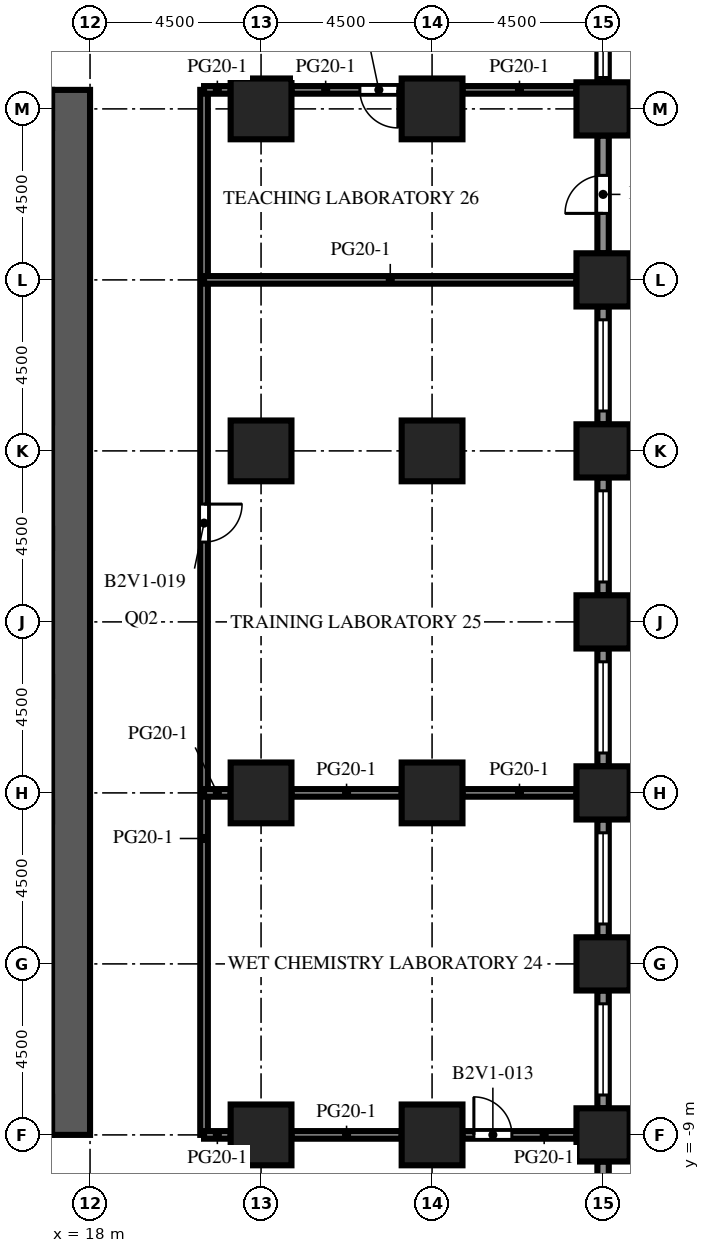
"""IFC4 building model, lengths in metres.
Left out: names, types, materials, properties, quantities, classifications, styles, units other than length and angle.
Written with IfcOpenShell. Run it as: python <this file> out.ifc"""

import sys

from ifc_helpers import new_model, si_unit, direction, frame, frame_2d, origin, origin_2d, place, context, subcontext, project, spatial, rectangle, extrude, element, fill, save


model = new_model("IFC4")
c1 = context("Model", 3, precision=1e-05, world=origin(), true_north=direction((0.0, 1.0)))
c2 = subcontext(c1, "Body", "Model", "MODEL_VIEW")
j1 = project(units=[si_unit("LENGTHUNIT", "METRE"), si_unit("PLANEANGLEUNIT", "RADIAN")], contexts=[c1])
p1 = place(None, origin())
s1 = spatial("IfcSite", under=j1, at=p1, CompositionType="ELEMENT")
p2 = place(p1, origin())
s2 = spatial("IfcBuilding", under=s1, at=p2, CompositionType="ELEMENT")
p3 = place(p2, frame((0.0, 0.0, 50.1)))
s3 = spatial("IfcBuildingStorey", under=s2, at=p3, CompositionType="ELEMENT", Elevation=50.1)
for number, where, z_axis, x_axis in (
    (1, (31.5, -9.0, 0.0), (0.0, 0.0, 1.0), (1.0, 0.0, 0.0)),
    (2, (31.5, -4.5, 0.0), (0.0, 0.0, 1.0), (1.0, 0.0, 0.0)),
    (3, (31.5, 0.0, 0.0), (0.0, 0.0, 1.0), (1.0, 0.0, 0.0)),
    (4, (31.5, 4.5, 0.0), (0.0, 0.0, 1.0), (1.0, 0.0, 0.0)),
    (5, (31.5, 9.0, 0.0), (0.0, 0.0, 1.0), (1.0, 0.0, 0.0)),
    (6, (31.5, 13.5, 0.0), (0.0, 0.0, 1.0), (1.0, 0.0, 0.0)),
    (7, (31.5, 18.0, 0.0), (0.0, 0.0, 1.0), (1.0, 0.0, 0.0)),
):
    element("IfcColumn", number, at=place(p3, frame(where, z_axis=z_axis, x_axis=x_axis)), inside=s3, PredefinedType="COLUMN", context=c2, shape_type="SweptSolid", body=[
        extrude(rectangle(XDim=1.4, YDim=1.4, at=origin_2d()), origin(), (0.0, 0.0, 1.0), 4.1),
    ])
for number, where, z_axis, x_axis in (
    (8, (22.5, -9.0, 0.0), (0.0, 0.0, 1.0), (1.0, 0.0, 0.0)),
    (9, (22.5, 0.0, 0.0), (0.0, 0.0, 1.0), (1.0, 0.0, 0.0)),
    (10, (22.5, 9.0, 0.0), (0.0, 0.0, 1.0), (1.0, 0.0, 0.0)),
    (11, (22.5, 18.0, 0.0), (0.0, 0.0, 1.0), (1.0, 0.0, 0.0)),
    (12, (27.0, -9.0, 0.0), (0.0, 0.0, 1.0), (1.0, 0.0, 0.0)),
    (13, (27.0, 0.0, 0.0), (0.0, 0.0, 1.0), (1.0, 0.0, 0.0)),
    (14, (27.0, 9.0, 0.0), (0.0, 0.0, 1.0), (1.0, 0.0, 0.0)),
    (15, (27.0, 18.0, 0.0), (0.0, 0.0, 1.0), (1.0, 0.0, 0.0)),
):
    element("IfcColumn", number, at=place(p3, frame(where, z_axis=z_axis, x_axis=x_axis)), inside=s3, PredefinedType="COLUMN", context=c2, shape_type="SweptSolid", body=[
        extrude(rectangle(XDim=1.6, YDim=1.6, at=origin_2d()), origin(), (0.0, 0.0, 1.0), 4.1),
    ])
p4 = place(p3, frame((17.5, -9.0, 0.0), z_axis=(0.0, 0.0, 1.0), x_axis=(0.0, 1.0, 0.0)))
e16 = element("IfcWall", 16, at=p4, inside=s3, PredefinedType="SHEAR", context=c2, shape_type="SweptSolid", body=[
    extrude(rectangle(XDim=27.5, YDim=1.0, at=frame_2d((13.75, 0.0))), origin(), (0.0, 0.0, 1.0), 4.1),
])
p5 = place(p4, frame((12.55, 0.0, 0.0)))
e17 = element("IfcOpeningElement", 17, at=p5, cuts=e16, PredefinedType="OPENING", context=c2, shape_type="SweptSolid", body=[
    extrude(rectangle(XDim=2.4, YDim=2.4, at=frame_2d((1.2, 1.2))), frame((0.0, 0.51, 0.0), z_axis=(0.0, -1.0, 0.0), x_axis=(1.0, 0.0, 0.0)), (0.0, 0.0, 1.0), 1.02),
])
p6 = place(p4, frame((6.825, 0.0, 0.0)))
e18 = element("IfcOpeningElement", 18, at=p6, cuts=e16, PredefinedType="OPENING", context=c2, shape_type="SweptSolid", body=[
    extrude(rectangle(XDim=1.2, YDim=2.1, at=frame_2d((0.6, 1.05))), frame((0.0, 0.51, 0.0), z_axis=(0.0, -1.0, 0.0), x_axis=(1.0, 0.0, 0.0)), (0.0, 0.0, 1.0), 1.02),
])
p7 = place(p4, frame((19.475, 0.0, 0.0)))
e19 = element("IfcOpeningElement", 19, at=p7, cuts=e16, PredefinedType="OPENING", context=c2, shape_type="SweptSolid", body=[
    extrude(rectangle(XDim=1.2, YDim=2.1, at=frame_2d((0.6, 1.05))), frame((0.0, 0.51, 0.0), z_axis=(0.0, -1.0, 0.0), x_axis=(1.0, 0.0, 0.0)), (0.0, 0.0, 1.0), 1.02),
])
p8 = place(p3, frame((31.5, -9.7, 0.0), z_axis=(0.0, 0.0, 1.0), x_axis=(0.0, -1.0, 0.0)))
e20 = element("IfcWall", 20, at=p8, inside=s3, PredefinedType="SOLIDWALL", context=c2, shape_type="SweptSolid", body=[
    extrude(rectangle(XDim=3.1, YDim=0.3, at=frame_2d((1.55, 0.0))), origin(), (0.0, 0.0, 1.0), 2.75),
])
p9 = place(p8, frame((0.475, 0.0, 0.8)))
e21 = element("IfcOpeningElement", 21, at=p9, cuts=e20, PredefinedType="OPENING", context=c2, shape_type="SweptSolid", body=[
    extrude(rectangle(XDim=1.2, YDim=1.7, at=frame_2d((0.6, 0.85))), frame((0.0, 0.16, 0.0), z_axis=(0.0, -1.0, 0.0), x_axis=(1.0, 0.0, 0.0)), (0.0, 0.0, 1.0), 0.32),
])
p10 = place(p3, frame((31.5, -5.2, 0.0), z_axis=(0.0, 0.0, 1.0), x_axis=(0.0, -1.0, 0.0)))
e22 = element("IfcWall", 22, at=p10, inside=s3, PredefinedType="SOLIDWALL", context=c2, shape_type="SweptSolid", body=[
    extrude(rectangle(XDim=3.1, YDim=0.3, at=frame_2d((1.55, 0.0))), origin(), (0.0, 0.0, 1.0), 2.75),
])
p11 = place(p10, frame((0.35, 0.0, 0.8)))
e23 = element("IfcOpeningElement", 23, at=p11, cuts=e22, PredefinedType="OPENING", context=c2, shape_type="SweptSolid", body=[
    extrude(rectangle(XDim=2.4, YDim=1.7, at=frame_2d((1.2, 0.85))), frame((0.0, 0.16, 0.0), z_axis=(0.0, -1.0, 0.0), x_axis=(1.0, 0.0, 0.0)), (0.0, 0.0, 1.0), 0.32),
])
p12 = place(p3, frame((31.5, -0.7, 0.0), z_axis=(0.0, 0.0, 1.0), x_axis=(0.0, -1.0, 0.0)))
e24 = element("IfcWall", 24, at=p12, inside=s3, PredefinedType="SOLIDWALL", context=c2, shape_type="SweptSolid", body=[
    extrude(rectangle(XDim=3.1, YDim=0.3, at=frame_2d((1.55, 0.0))), origin(), (0.0, 0.0, 1.0), 2.75),
])
p13 = place(p12, frame((0.35, 0.0, 0.8)))
e25 = element("IfcOpeningElement", 25, at=p13, cuts=e24, PredefinedType="OPENING", context=c2, shape_type="SweptSolid", body=[
    extrude(rectangle(XDim=2.4, YDim=1.7, at=frame_2d((1.2, 0.85))), frame((0.0, 0.16, 0.0), z_axis=(0.0, -1.0, 0.0), x_axis=(1.0, 0.0, 0.0)), (0.0, 0.0, 1.0), 0.32),
])
p14 = place(p3, frame((31.5, 3.8, 0.0), z_axis=(0.0, 0.0, 1.0), x_axis=(0.0, -1.0, 0.0)))
e26 = element("IfcWall", 26, at=p14, inside=s3, PredefinedType="SOLIDWALL", context=c2, shape_type="SweptSolid", body=[
    extrude(rectangle(XDim=3.1, YDim=0.3, at=frame_2d((1.55, 0.0))), origin(), (0.0, 0.0, 1.0), 2.75),
])
p15 = place(p14, frame((0.35, 0.0, 0.8)))
e27 = element("IfcOpeningElement", 27, at=p15, cuts=e26, PredefinedType="OPENING", context=c2, shape_type="SweptSolid", body=[
    extrude(rectangle(XDim=2.4, YDim=1.7, at=frame_2d((1.2, 0.85))), frame((0.0, 0.16, 0.0), z_axis=(0.0, -1.0, 0.0), x_axis=(1.0, 0.0, 0.0)), (0.0, 0.0, 1.0), 0.32),
])
p16 = place(p3, frame((31.5, 8.3, 0.0), z_axis=(0.0, 0.0, 1.0), x_axis=(0.0, -1.0, 0.0)))
e28 = element("IfcWall", 28, at=p16, inside=s3, PredefinedType="SOLIDWALL", context=c2, shape_type="SweptSolid", body=[
    extrude(rectangle(XDim=3.1, YDim=0.3, at=frame_2d((1.55, 0.0))), origin(), (0.0, 0.0, 1.0), 2.75),
])
p17 = place(p16, frame((0.35, 0.0, 0.8)))
e29 = element("IfcOpeningElement", 29, at=p17, cuts=e28, PredefinedType="OPENING", context=c2, shape_type="SweptSolid", body=[
    extrude(rectangle(XDim=2.4, YDim=1.7, at=frame_2d((1.2, 0.85))), frame((0.0, 0.16, 0.0), z_axis=(0.0, -1.0, 0.0), x_axis=(1.0, 0.0, 0.0)), (0.0, 0.0, 1.0), 0.32),
])
p18 = place(p3, frame((31.5, 12.8, 0.0), z_axis=(0.0, 0.0, 1.0), x_axis=(0.0, -1.0, 0.0)))
e30 = element("IfcWall", 30, at=p18, inside=s3, PredefinedType="SOLIDWALL", context=c2, shape_type="SweptSolid", body=[
    extrude(rectangle(XDim=3.1, YDim=0.3, at=frame_2d((1.55, 0.0))), origin(), (0.0, 0.0, 1.0), 2.75),
])
p19 = place(p18, frame((0.35, 0.0, 0.8)))
e31 = element("IfcOpeningElement", 31, at=p19, cuts=e30, PredefinedType="OPENING", context=c2, shape_type="SweptSolid", body=[
    extrude(rectangle(XDim=2.4, YDim=1.7, at=frame_2d((1.2, 0.85))), frame((0.0, 0.16, 0.0), z_axis=(0.0, -1.0, 0.0), x_axis=(1.0, 0.0, 0.0)), (0.0, 0.0, 1.0), 0.32),
])
p20 = place(p3, frame((31.5, 17.3, 0.0), z_axis=(0.0, 0.0, 1.0), x_axis=(0.0, -1.0, 0.0)))
e32 = element("IfcWall", 32, at=p20, inside=s3, PredefinedType="SOLIDWALL", context=c2, shape_type="SweptSolid", body=[
    extrude(rectangle(XDim=3.1, YDim=0.3, at=frame_2d((1.55, 0.0))), origin(), (0.0, 0.0, 1.0), 2.75),
])
p21 = place(p20, frame((1.05, 0.0, 0.0)))
e33 = element("IfcOpeningElement", 33, at=p21, cuts=e32, PredefinedType="OPENING", context=c2, shape_type="SweptSolid", body=[
    extrude(rectangle(XDim=1.0, YDim=2.2, at=frame_2d((0.5, 1.1))), frame((0.0, 0.16, 0.0), z_axis=(0.0, -1.0, 0.0), x_axis=(1.0, 0.0, 0.0)), (0.0, 0.0, 1.0), 0.32),
])
p22 = place(p3, frame((31.5, 21.8, 0.0), z_axis=(0.0, 0.0, 1.0), x_axis=(0.0, -1.0, 0.0)))
e34 = element("IfcWall", 34, at=p22, inside=s3, PredefinedType="SOLIDWALL", context=c2, shape_type="SweptSolid", body=[
    extrude(rectangle(XDim=3.1, YDim=0.3, at=frame_2d((1.55, 0.0))), origin(), (0.0, 0.0, 1.0), 2.75),
])
p23 = place(p22, frame((0.575, 0.0, 0.8)))
e35 = element("IfcOpeningElement", 35, at=p23, cuts=e34, PredefinedType="OPENING", context=c2, shape_type="SweptSolid", body=[
    extrude(rectangle(XDim=2.4, YDim=1.7, at=frame_2d((1.2, 0.85))), frame((0.0, 0.16, 0.0), z_axis=(0.0, -1.0, 0.0), x_axis=(1.0, 0.0, 0.0)), (0.0, 0.0, 1.0), 0.32),
])
p24 = place(p3, frame((21.0, 18.5, 0.0), z_axis=(0.0, 0.0, 1.0), x_axis=(0.0, -1.0, 0.0)))
e36 = element("IfcWall", 36, at=p24, inside=s3, PredefinedType="PARTITIONING", context=c2, shape_type="SweptSolid", body=[
    extrude(rectangle(XDim=27.5, YDim=0.2, at=frame_2d((13.75, 0.0))), origin(), (0.0, 0.0, 1.0), 3.65),
])
p25 = place(p24, frame((10.9, 0.0, 0.0)))
e37 = element("IfcOpeningElement", 37, at=p25, cuts=e36, PredefinedType="OPENING", context=c2, shape_type="SweptSolid", body=[
    extrude(rectangle(XDim=1.0, YDim=2.1, at=frame_2d((0.5, 1.05))), frame((0.0, 0.11, 0.0), z_axis=(0.0, -1.0, 0.0), x_axis=(1.0, 0.0, 0.0)), (0.0, 0.0, 1.0), 0.22),
])
p26 = place(p3, frame((21.0, -9.0, 0.0), z_axis=(0.0, 0.0, 1.0), x_axis=(1.0, 0.0, 0.0)))
e38 = element("IfcWall", 38, at=p26, inside=s3, PredefinedType="PARTITIONING", context=c2, shape_type="SweptSolid", body=[
    extrude(rectangle(XDim=0.7, YDim=0.2, at=frame_2d((0.35, 0.0))), origin(), (0.0, 0.0, 1.0), 3.65),
])
p27 = place(p3, frame((23.3, -9.0, 0.0), z_axis=(0.0, 0.0, 1.0), x_axis=(1.0, 0.0, 0.0)))
e39 = element("IfcWall", 39, at=p27, inside=s3, PredefinedType="PARTITIONING", context=c2, shape_type="SweptSolid", body=[
    extrude(rectangle(XDim=2.9, YDim=0.2, at=frame_2d((1.45, 0.0))), origin(), (0.0, 0.0, 1.0), 3.65),
])
p28 = place(p3, frame((27.8, -9.0, 0.0), z_axis=(0.0, 0.0, 1.0), x_axis=(1.0, 0.0, 0.0)))
e40 = element("IfcWall", 40, at=p28, inside=s3, PredefinedType="PARTITIONING", context=c2, shape_type="SweptSolid", body=[
    extrude(rectangle(XDim=3.0, YDim=0.2, at=frame_2d((1.5, 0.0))), origin(), (0.0, 0.0, 1.0), 3.65),
])
p29 = place(p28, frame((0.3, 0.0, 0.0)))
e41 = element("IfcOpeningElement", 41, at=p29, cuts=e40, PredefinedType="OPENING", context=c2, shape_type="SweptSolid", body=[
    extrude(rectangle(XDim=1.0, YDim=2.1, at=frame_2d((0.5, 1.05))), frame((0.0, 0.11, 0.0), z_axis=(0.0, -1.0, 0.0), x_axis=(1.0, 0.0, 0.0)), (0.0, 0.0, 1.0), 0.22),
])
p30 = place(p3, frame((21.0, 0.0, 0.0), z_axis=(0.0, 0.0, 1.0), x_axis=(1.0, 0.0, 0.0)))
e42 = element("IfcWall", 42, at=p30, inside=s3, PredefinedType="PARTITIONING", context=c2, shape_type="SweptSolid", body=[
    extrude(rectangle(XDim=0.7, YDim=0.2, at=frame_2d((0.35, 0.0))), origin(), (0.0, 0.0, 1.0), 3.65),
])
p31 = place(p3, frame((23.3, 0.0, 0.0), z_axis=(0.0, 0.0, 1.0), x_axis=(1.0, 0.0, 0.0)))
e43 = element("IfcWall", 43, at=p31, inside=s3, PredefinedType="PARTITIONING", context=c2, shape_type="SweptSolid", body=[
    extrude(rectangle(XDim=2.9, YDim=0.2, at=frame_2d((1.45, 0.0))), origin(), (0.0, 0.0, 1.0), 3.65),
])
p32 = place(p3, frame((27.8, 0.0, 0.0), z_axis=(0.0, 0.0, 1.0), x_axis=(1.0, 0.0, 0.0)))
e44 = element("IfcWall", 44, at=p32, inside=s3, PredefinedType="PARTITIONING", context=c2, shape_type="SweptSolid", body=[
    extrude(rectangle(XDim=3.0, YDim=0.2, at=frame_2d((1.5, 0.0))), origin(), (0.0, 0.0, 1.0), 3.65),
])
p33 = place(p3, frame((21.0, 13.5, 0.0), z_axis=(0.0, 0.0, 1.0), x_axis=(1.0, 0.0, 0.0)))
e45 = element("IfcWall", 45, at=p33, inside=s3, PredefinedType="PARTITIONING", context=c2, shape_type="SweptSolid", body=[
    extrude(rectangle(XDim=9.8, YDim=0.2, at=frame_2d((4.9, 0.0))), origin(), (0.0, 0.0, 1.0), 3.65),
])
p34 = place(p3, frame((21.0, 18.5, 0.0), z_axis=(0.0, 0.0, 1.0), x_axis=(1.0, 0.0, 0.0)))
e46 = element("IfcWall", 46, at=p34, inside=s3, PredefinedType="PARTITIONING", context=c2, shape_type="SweptSolid", body=[
    extrude(rectangle(XDim=0.7, YDim=0.2, at=frame_2d((0.35, 0.0))), origin(), (0.0, 0.0, 1.0), 3.65),
])
p35 = place(p3, frame((26.2, 18.5, 0.0), z_axis=(0.0, 0.0, 1.0), x_axis=(-1.0, 0.0, 0.0)))
e47 = element("IfcWall", 47, at=p35, inside=s3, PredefinedType="PARTITIONING", context=c2, shape_type="SweptSolid", body=[
    extrude(rectangle(XDim=2.9, YDim=0.2, at=frame_2d((1.45, 0.0))), origin(), (0.0, 0.0, 1.0), 3.65),
])
p36 = place(p35, frame((0.1, 0.0, 0.0)))
e48 = element("IfcOpeningElement", 48, at=p36, cuts=e47, PredefinedType="OPENING", context=c2, shape_type="SweptSolid", body=[
    extrude(rectangle(XDim=1.0, YDim=2.1, at=frame_2d((0.5, 1.05))), frame((0.0, 0.11, 0.0), z_axis=(0.0, -1.0, 0.0), x_axis=(1.0, 0.0, 0.0)), (0.0, 0.0, 1.0), 0.22),
])
p37 = place(p3, frame((27.8, 18.5, 0.0), z_axis=(0.0, 0.0, 1.0), x_axis=(1.0, 0.0, 0.0)))
e49 = element("IfcWall", 49, at=p37, inside=s3, PredefinedType="PARTITIONING", context=c2, shape_type="SweptSolid", body=[
    extrude(rectangle(XDim=3.0, YDim=0.2, at=frame_2d((1.5, 0.0))), origin(), (0.0, 0.0, 1.0), 3.65),
])
p38 = place(p11, origin())
e50 = element("IfcWindow", 50, at=p38, inside=s3, PartitioningType="SINGLE_PANEL", PredefinedType="WINDOW", context=c2, shape_type="SweptSolid", body=[
    extrude(rectangle(XDim=2.4, YDim=1.7, at=frame_2d((1.2, 0.85))), frame((0.0, 0.03, 0.0), z_axis=(0.0, -1.0, 0.0), x_axis=(1.0, 0.0, 0.0)), (0.0, 0.0, 1.0), 0.06),
])
fill(e23, e50)
p39 = place(p13, origin())
e51 = element("IfcWindow", 51, at=p39, inside=s3, PartitioningType="SINGLE_PANEL", PredefinedType="WINDOW", context=c2, shape_type="SweptSolid", body=[
    extrude(rectangle(XDim=2.4, YDim=1.7, at=frame_2d((1.2, 0.85))), frame((0.0, 0.03, 0.0), z_axis=(0.0, -1.0, 0.0), x_axis=(1.0, 0.0, 0.0)), (0.0, 0.0, 1.0), 0.06),
])
fill(e25, e51)
p40 = place(p15, origin())
e52 = element("IfcWindow", 52, at=p40, inside=s3, PartitioningType="SINGLE_PANEL", PredefinedType="WINDOW", context=c2, shape_type="SweptSolid", body=[
    extrude(rectangle(XDim=2.4, YDim=1.7, at=frame_2d((1.2, 0.85))), frame((0.0, 0.03, 0.0), z_axis=(0.0, -1.0, 0.0), x_axis=(1.0, 0.0, 0.0)), (0.0, 0.0, 1.0), 0.06),
])
fill(e27, e52)
p41 = place(p17, origin())
e53 = element("IfcWindow", 53, at=p41, inside=s3, PartitioningType="SINGLE_PANEL", PredefinedType="WINDOW", context=c2, shape_type="SweptSolid", body=[
    extrude(rectangle(XDim=2.4, YDim=1.7, at=frame_2d((1.2, 0.85))), frame((0.0, 0.03, 0.0), z_axis=(0.0, -1.0, 0.0), x_axis=(1.0, 0.0, 0.0)), (0.0, 0.0, 1.0), 0.06),
])
fill(e29, e53)
p42 = place(p19, origin())
e54 = element("IfcWindow", 54, at=p42, inside=s3, PartitioningType="SINGLE_PANEL", PredefinedType="WINDOW", context=c2, shape_type="SweptSolid", body=[
    extrude(rectangle(XDim=2.4, YDim=1.7, at=frame_2d((1.2, 0.85))), frame((0.0, 0.03, 0.0), z_axis=(0.0, -1.0, 0.0), x_axis=(1.0, 0.0, 0.0)), (0.0, 0.0, 1.0), 0.06),
])
fill(e31, e54)
p43 = place(p21, origin())
e55 = element("IfcDoor", 55, at=p43, inside=s3, OperationType="SINGLE_SWING_RIGHT", PredefinedType="DOOR", context=c2, shape_type="SweptSolid", body=[
    extrude(rectangle(XDim=1.0, YDim=2.2, at=frame_2d((0.5, 1.1))), frame((0.0, 0.025, 0.0), z_axis=(0.0, -1.0, 0.0), x_axis=(1.0, 0.0, 0.0)), (0.0, 0.0, 1.0), 0.05),
])
fill(e33, e55)
p44 = place(p23, origin())
e56 = element("IfcWindow", 56, at=p44, inside=s3, PartitioningType="SINGLE_PANEL", PredefinedType="WINDOW", context=c2, shape_type="SweptSolid", body=[
    extrude(rectangle(XDim=2.4, YDim=1.7, at=frame_2d((1.2, 0.85))), frame((0.0, 0.03, 0.0), z_axis=(0.0, -1.0, 0.0), x_axis=(1.0, 0.0, 0.0)), (0.0, 0.0, 1.0), 0.06),
])
fill(e35, e56)
p45 = place(p5, origin())
e57 = element("IfcDoor", 57, at=p45, inside=s3, OperationType="DOUBLE_DOOR_DOUBLE_SWING", PredefinedType="DOOR", context=c2, shape_type="SweptSolid", body=[
    extrude(rectangle(XDim=2.4, YDim=2.4, at=frame_2d((1.2, 1.2))), frame((0.0, 0.025, 0.0), z_axis=(0.0, -1.0, 0.0), x_axis=(1.0, 0.0, 0.0)), (0.0, 0.0, 1.0), 0.05),
])
fill(e17, e57)
p46 = place(p6, frame((1.2, 0.0, 0.0), z_axis=(0.0, 0.0, 1.0), x_axis=(-1.0, 0.0, 0.0)))
e58 = element("IfcDoor", 58, at=p46, inside=s3, OperationType="SINGLE_SWING_LEFT", PredefinedType="DOOR", context=c2, shape_type="SweptSolid", body=[
    extrude(rectangle(XDim=1.2, YDim=2.1, at=frame_2d((0.6, 1.05))), frame((0.0, 0.025, 0.0), z_axis=(0.0, -1.0, 0.0), x_axis=(1.0, 0.0, 0.0)), (0.0, 0.0, 1.0), 0.05),
])
fill(e18, e58)
p47 = place(p7, frame((1.2, 0.0, 0.0), z_axis=(0.0, 0.0, 1.0), x_axis=(-1.0, 0.0, 0.0)))
e59 = element("IfcDoor", 59, at=p47, inside=s3, OperationType="SINGLE_SWING_LEFT", PredefinedType="DOOR", context=c2, shape_type="SweptSolid", body=[
    extrude(rectangle(XDim=1.2, YDim=2.1, at=frame_2d((0.6, 1.05))), frame((0.0, 0.025, 0.0), z_axis=(0.0, -1.0, 0.0), x_axis=(1.0, 0.0, 0.0)), (0.0, 0.0, 1.0), 0.05),
])
fill(e19, e59)
p48 = place(p29, origin())
e60 = element("IfcDoor", 60, at=p48, inside=s3, OperationType="SINGLE_SWING_LEFT", PredefinedType="DOOR", context=c2, shape_type="SweptSolid", body=[
    extrude(rectangle(XDim=1.0, YDim=2.1, at=frame_2d((0.5, 1.05))), frame((0.0, 0.025, 0.0), z_axis=(0.0, -1.0, 0.0), x_axis=(1.0, 0.0, 0.0)), (0.0, 0.0, 1.0), 0.05),
])
fill(e41, e60)
p49 = place(p36, origin())
e61 = element("IfcDoor", 61, at=p49, inside=s3, OperationType="SINGLE_SWING_LEFT", PredefinedType="DOOR", context=c2, shape_type="SweptSolid", body=[
    extrude(rectangle(XDim=1.0, YDim=2.1, at=frame_2d((0.5, 1.05))), frame((0.0, 0.025, 0.0), z_axis=(0.0, -1.0, 0.0), x_axis=(1.0, 0.0, 0.0)), (0.0, 0.0, 1.0), 0.05),
])
fill(e48, e61)
p50 = place(p25, origin())
e62 = element("IfcDoor", 62, at=p50, inside=s3, OperationType="SINGLE_SWING_LEFT", PredefinedType="DOOR", context=c2, shape_type="SweptSolid", body=[
    extrude(rectangle(XDim=1.0, YDim=2.1, at=frame_2d((0.5, 1.05))), frame((0.0, 0.025, 0.0), z_axis=(0.0, -1.0, 0.0), x_axis=(1.0, 0.0, 0.0)), (0.0, 0.0, 1.0), 0.05),
])
fill(e37, e62)
save(model, sys.argv[1])
